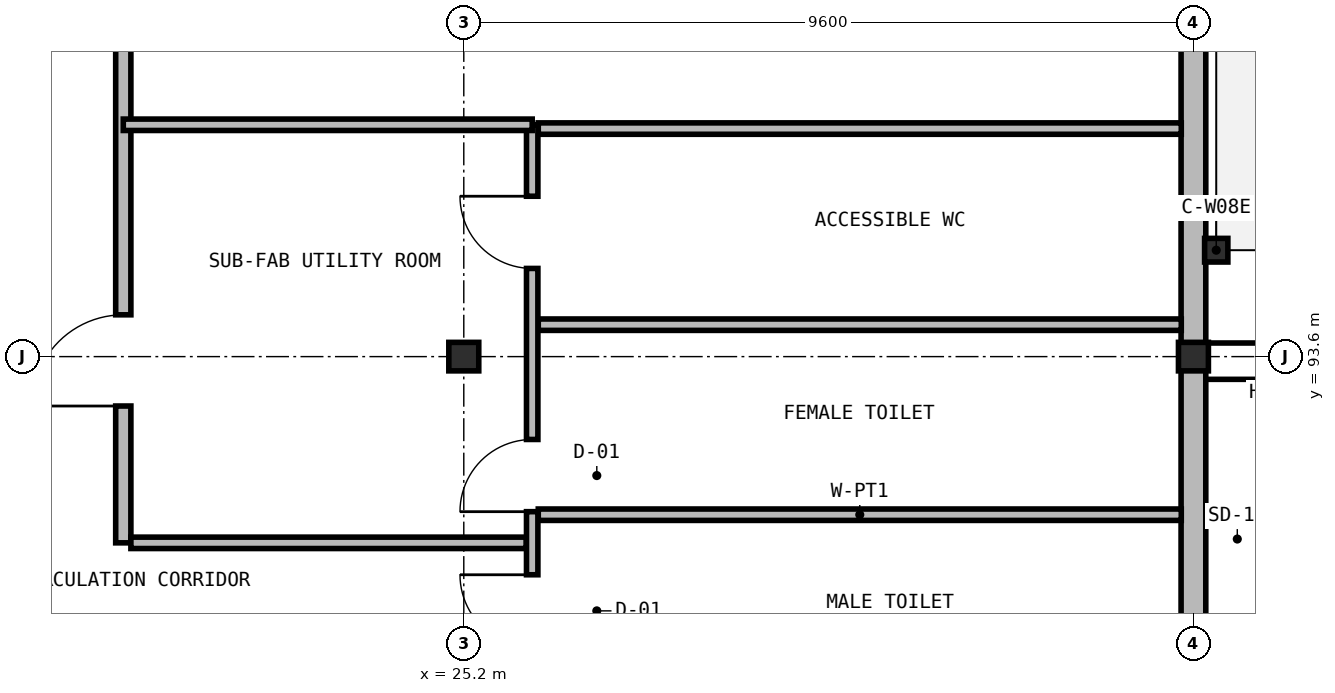
"""IFC4 building model, lengths in metres.
Left out: names, types, materials, properties, quantities, classifications, styles, units other than length and angle.
Written with IfcOpenShell. Run it as: python <this file> out.ifc"""

import sys

from ifc_helpers import new_model, si_unit, direction, frame, frame_2d, origin, origin_2d, place, context, subcontext, project, spatial, rectangle, i_section, extrude, element, fill, save


model = new_model("IFC4")
c1 = context("Model", 3, precision=1e-05, world=origin(), true_north=direction((0.0, 1.0)))
c2 = subcontext(c1, "Body", "Model", "MODEL_VIEW")
j1 = project(units=[si_unit("LENGTHUNIT", "METRE"), si_unit("PLANEANGLEUNIT", "RADIAN")], contexts=[c1])
p1 = place(None, origin())
s1 = spatial("IfcSite", under=j1, at=p1, CompositionType="ELEMENT")
p2 = place(p1, origin())
s2 = spatial("IfcBuilding", under=s1, at=p2, CompositionType="ELEMENT")
p3 = place(p2, origin())
s3 = spatial("IfcBuildingStorey", under=s2, at=p3, CompositionType="ELEMENT", Elevation=0.0)
for number, where, z_axis, x_axis in (
    (1, (25.2, 93.6, 0.0), (0.0, 0.0, 1.0), (1.0, 0.0, 0.0)),
    (2, (34.8, 93.6, 0.0), (0.0, 0.0, 1.0), (1.0, 0.0, 0.0)),
):
    element("IfcColumn", number, at=place(p3, frame(where, z_axis=z_axis, x_axis=x_axis)), inside=s3, PredefinedType="COLUMN", context=c2, shape_type="SweptSolid", body=[
        extrude(i_section(OverallWidth=0.394, OverallDepth=0.375, WebThickness=0.02, FlangeThickness=0.032, at=origin_2d()), origin(), (0.0, 0.0, 1.0), 5.25),
    ])
p4 = place(p3, frame((35.1, 95.0, 0.0), z_axis=(0.0, 0.0, 1.0), x_axis=(1.0, 0.0, 0.0)))
e3 = element("IfcColumn", 3, at=p4, inside=s3, PredefinedType="COLUMN", context=c2, shape_type="SweptSolid", body=[
    extrude(i_section(OverallWidth=0.306, OverallDepth=0.311, WebThickness=0.011, FlangeThickness=0.017, at=origin_2d()), origin(), (0.0, 0.0, 1.0), 5.25),
])
p5 = place(p3, frame((34.8, 93.596, 0.0), z_axis=(0.0, 0.0, 1.0), x_axis=(0.0, -1.0, 0.0)))
e4 = element("IfcWall", 4, at=p5, inside=s3, PredefinedType="SOLIDWALL", context=c2, shape_type="SweptSolid", body=[
    extrude(rectangle(XDim=4.792, YDim=0.325, at=frame_2d((2.396, 0.0))), origin(), (0.0, 0.0, 1.0), 4.93),
])
p6 = place(p3, frame((34.8, 103.196, 0.0), z_axis=(0.0, 0.0, 1.0), x_axis=(0.0, -1.0, 0.0)))
e5 = element("IfcWall", 5, at=p6, inside=s3, PredefinedType="SOLIDWALL", context=c2, shape_type="SweptSolid", body=[
    extrude(rectangle(XDim=9.592, YDim=0.325, at=frame_2d((4.796, 0.0))), origin(), (0.0, 0.0, 1.0), 4.444),
])
for number, where, z_axis, x_axis in (
    (6, (26.18, 91.52, 0.0), (0.0, 0.0, 1.0), (1.0, 0.0, 0.0)),
    (7, (26.18, 94.02, 0.0), (0.0, 0.0, 1.0), (1.0, 0.0, 0.0)),
    (8, (26.18, 96.6, 0.0), (0.0, 0.0, 1.0), (1.0, 0.0, 0.0)),
):
    element("IfcWall", number, at=place(p3, frame(where, z_axis=z_axis, x_axis=x_axis)), inside=s3, PredefinedType="PARTITIONING", context=c2, shape_type="SweptSolid", body=[
        extrude(rectangle(XDim=8.46, YDim=0.15, at=frame_2d((4.23, 0.0))), origin(), (0.0, 0.0, 1.0), 4.93),
    ])
p7 = place(p3, frame((26.1, 89.12, 0.0), z_axis=(0.0, 0.0, 1.0), x_axis=(0.0, 1.0, 0.0)))
e9 = element("IfcWall", 9, at=p7, inside=s3, PredefinedType="PARTITIONING", context=c2, shape_type="SweptSolid", body=[
    extrude(rectangle(XDim=7.53, YDim=0.15, at=frame_2d((3.765, 0.0))), origin(), (0.0, 0.0, 1.0), 4.93),
])
p8 = place(p7, frame((0.66, 0.0, 0.0)))
e10 = element("IfcOpeningElement", 10, at=p8, cuts=e9, PredefinedType="OPENING", context=c2, shape_type="SweptSolid", body=[
    extrude(rectangle(XDim=0.95, YDim=2.1, at=frame_2d((0.475, 1.05))), frame((0.0, 0.085, 0.0), z_axis=(0.0, -1.0, 0.0), x_axis=(1.0, 0.0, 0.0)), (0.0, 0.0, 1.0), 0.17),
])
p9 = place(p7, frame((2.44, 0.0, 0.0)))
e11 = element("IfcOpeningElement", 11, at=p9, cuts=e9, PredefinedType="OPENING", context=c2, shape_type="SweptSolid", body=[
    extrude(rectangle(XDim=0.95, YDim=2.1, at=frame_2d((0.475, 1.05))), frame((0.0, 0.085, 0.0), z_axis=(0.0, -1.0, 0.0), x_axis=(1.0, 0.0, 0.0)), (0.0, 0.0, 1.0), 0.17),
])
p10 = place(p7, frame((5.64, 0.0, 0.0)))
e12 = element("IfcOpeningElement", 12, at=p10, cuts=e9, PredefinedType="OPENING", context=c2, shape_type="SweptSolid", body=[
    extrude(rectangle(XDim=0.95, YDim=2.1, at=frame_2d((0.475, 1.05))), frame((0.0, 0.085, 0.0), z_axis=(0.0, -1.0, 0.0), x_axis=(1.0, 0.0, 0.0)), (0.0, 0.0, 1.0), 0.17),
])
p11 = place(p3, frame((20.72, 91.15, 0.0), z_axis=(0.0, 0.0, 1.0), x_axis=(0.0, 1.0, 0.0)))
e13 = element("IfcWall", 13, at=p11, inside=s3, PredefinedType="SOLIDWALL", context=c2, shape_type="SweptSolid", body=[
    extrude(rectangle(XDim=12.8, YDim=0.2, at=frame_2d((6.4, 0.0))), origin(), (0.0, 0.0, 1.0), 4.93),
])
p12 = place(p11, frame((1.8, 0.0, 0.0)))
e14 = element("IfcOpeningElement", 14, at=p12, cuts=e13, PredefinedType="OPENING", context=c2, shape_type="SweptSolid", body=[
    extrude(rectangle(XDim=1.2, YDim=2.2, at=frame_2d((0.6, 1.1))), frame((0.0, 0.11, 0.0), z_axis=(0.0, -1.0, 0.0), x_axis=(1.0, 0.0, 0.0)), (0.0, 0.0, 1.0), 0.22),
])
p13 = place(p11, frame((6.8, 0.0, 0.0)))
e15 = element("IfcOpeningElement", 15, at=p13, cuts=e13, PredefinedType="OPENING", context=c2, shape_type="SweptSolid", body=[
    extrude(rectangle(XDim=1.35, YDim=2.2, at=frame_2d((0.675, 1.1))), frame((0.0, 0.11, 0.0), z_axis=(0.0, -1.0, 0.0), x_axis=(1.0, 0.0, 0.0)), (0.0, 0.0, 1.0), 0.22),
])
p14 = place(p3, frame((20.82, 91.15, 0.0), z_axis=(0.0, 0.0, 1.0), x_axis=(1.0, 0.0, 0.0)))
e16 = element("IfcWall", 16, at=p14, inside=s3, PredefinedType="PARTITIONING", context=c2, shape_type="SweptSolid", body=[
    extrude(rectangle(XDim=5.2, YDim=0.15, at=frame_2d((2.6, 0.0))), origin(), (0.0, 0.0, 1.0), 4.93),
])
p15 = place(p3, frame((20.72, 96.65, 0.0), z_axis=(0.0, 0.0, 1.0), x_axis=(1.0, 0.0, 0.0)))
e17 = element("IfcWall", 17, at=p15, inside=s3, PredefinedType="PARTITIONING", context=c2, shape_type="SweptSolid", body=[
    extrude(rectangle(XDim=5.38, YDim=0.15, at=frame_2d((2.69, 0.0))), origin(), (0.0, 0.0, 1.0), 4.93),
])
p16 = place(p8, origin())
e18 = element("IfcDoor", 18, at=p16, inside=s3, OperationType="SINGLE_SWING_RIGHT", PredefinedType="DOOR", context=c2, shape_type="SweptSolid", body=[
    extrude(rectangle(XDim=0.95, YDim=2.1, at=frame_2d((0.475, 1.05))), frame((0.0, 0.025, 0.0), z_axis=(0.0, -1.0, 0.0), x_axis=(1.0, 0.0, 0.0)), (0.0, 0.0, 1.0), 0.05),
])
fill(e10, e18)
p17 = place(p9, origin())
e19 = element("IfcDoor", 19, at=p17, inside=s3, OperationType="SINGLE_SWING_LEFT", PredefinedType="DOOR", context=c2, shape_type="SweptSolid", body=[
    extrude(rectangle(XDim=0.95, YDim=2.1, at=frame_2d((0.475, 1.05))), frame((0.0, 0.025, 0.0), z_axis=(0.0, -1.0, 0.0), x_axis=(1.0, 0.0, 0.0)), (0.0, 0.0, 1.0), 0.05),
])
fill(e11, e19)
p18 = place(p10, origin())
e20 = element("IfcDoor", 20, at=p18, inside=s3, OperationType="SINGLE_SWING_RIGHT", PredefinedType="DOOR", context=c2, shape_type="SweptSolid", body=[
    extrude(rectangle(XDim=0.95, YDim=2.1, at=frame_2d((0.475, 1.05))), frame((0.0, 0.025, 0.0), z_axis=(0.0, -1.0, 0.0), x_axis=(1.0, 0.0, 0.0)), (0.0, 0.0, 1.0), 0.05),
])
fill(e12, e20)
p19 = place(p12, origin())
e21 = element("IfcDoor", 21, at=p19, inside=s3, OperationType="SINGLE_SWING_LEFT", PredefinedType="DOOR", context=c2, shape_type="SweptSolid", body=[
    extrude(rectangle(XDim=1.2, YDim=2.2, at=frame_2d((0.6, 1.1))), frame((0.0, 0.025, 0.0), z_axis=(0.0, -1.0, 0.0), x_axis=(1.0, 0.0, 0.0)), (0.0, 0.0, 1.0), 0.05),
])
fill(e14, e21)
save(model, sys.argv[1])
